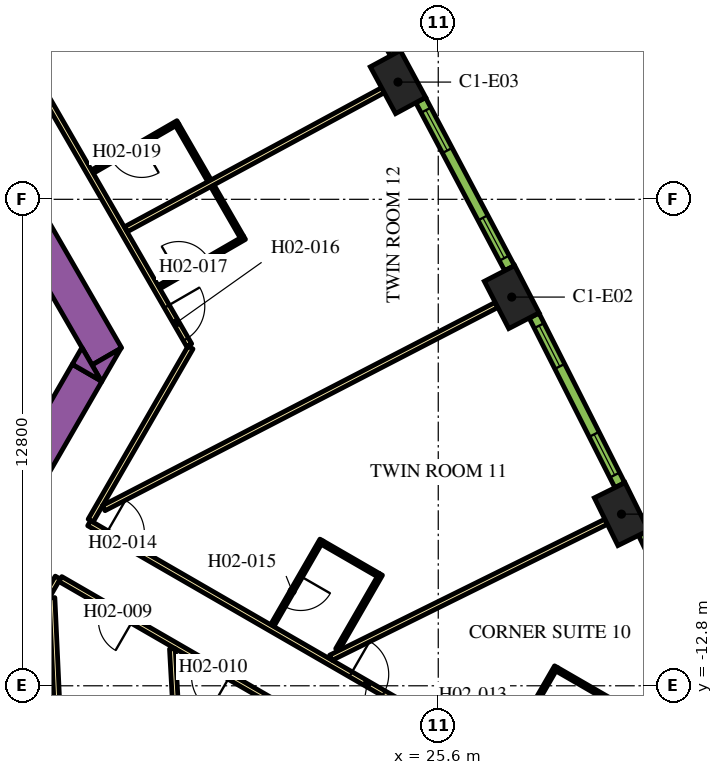
"""IFC4 building model, lengths in metres.
Left out: names, types, materials, properties, quantities, classifications, styles, units other than length and angle.
Written with IfcOpenShell. Run it as: python <this file> out.ifc"""

import sys

from ifc_helpers import new_model, si_unit, direction, frame, frame_2d, origin, origin_2d, place, context, subcontext, project, spatial, polyline, rectangle, outline, extrude, element, fill, save


model = new_model("IFC4")
c1 = context("Model", 3, precision=1e-05, world=origin(), true_north=direction((0.0, 1.0)))
c2 = subcontext(c1, "Body", "Model", "MODEL_VIEW")
j1 = project(units=[si_unit("LENGTHUNIT", "METRE"), si_unit("PLANEANGLEUNIT", "RADIAN")], contexts=[c1])
p1 = place(None, origin())
s1 = spatial("IfcSite", under=j1, at=p1, CompositionType="ELEMENT")
p2 = place(p1, origin())
s2 = spatial("IfcBuilding", under=s1, at=p2, CompositionType="ELEMENT")
p3 = place(p2, frame((0.0, 0.0, 43.2)))
s3 = spatial("IfcBuildingStorey", under=s2, at=p3, CompositionType="ELEMENT", Elevation=43.2)
for number, where, z_axis, x_axis in (
    (1, (30.421, -8.284, 0.0), (0.0, 0.0, 1.0), (-0.443, 0.897, 0.0)),
    (2, (27.533, -2.572, 0.0), (0.0, 0.0, 1.0), (-0.459, 0.888, 0.0)),
    (3, (24.54, 3.085, 0.0), (0.0, 0.0, 1.0), (-0.476, 0.88, 0.0)),
):
    element("IfcColumn", number, at=place(p3, frame(where, z_axis=z_axis, x_axis=x_axis)), inside=s3, PredefinedType="COLUMN", context=c2, shape_type="SweptSolid", body=[
        extrude(rectangle(XDim=1.4, YDim=0.9, at=origin_2d()), origin(), (0.0, 0.0, 1.0), 3.9),
    ])
p4 = place(p3, frame((6.776, 13.364, 0.0), z_axis=(0.0, 0.0, 1.0), x_axis=(0.500004177138, -0.8660229921, 0.0)))
e4 = element("IfcWall", 4, at=p4, inside=s3, PredefinedType="SOLIDWALL", context=c2, shape_type="SweptSolid", body=[
    extrude(rectangle(XDim=20.204, YDim=0.9, at=frame_2d((10.102, 0.0))), origin(), (0.0, 0.0, 1.0), 3.9),
])
p5 = place(p3, origin())
e5 = element("IfcWall", 5, at=p5, inside=s3, PredefinedType="SOLIDWALL", context=c2, shape_type="SweptSolid", body=[
    extrude(outline(polyline([(16.743, -4.8), (16.489, -4.36), (17.251, -3.92), (16.743, -4.8)])), origin(), (0.0, 0.0, 1.0), 3.9),
])
p6 = place(p3, frame((11.943, -12.214, 0.0), z_axis=(0.0, 0.0, 1.0), x_axis=(0.49998092645, 0.866036415623, 0.0)))
e6 = element("IfcWall", 6, at=p6, inside=s3, PredefinedType="SOLIDWALL", context=c2, shape_type="SweptSolid", body=[
    extrude(rectangle(XDim=8.83, YDim=0.9, at=frame_2d((4.415, 0.0))), origin(), (0.0, 0.0, 1.0), 3.9),
])
e7 = element("IfcWall", 7, at=p5, inside=s3, PredefinedType="SOLIDWALL", context=c2, shape_type="SweptSolid", body=[
    extrude(outline(polyline([(16.223, -3.9), (16.732, -4.78), (15.969, -4.34), (16.223, -3.9)])), origin(), (0.0, 0.0, 1.0), 3.9),
])
p7 = place(p3, frame((16.412, -8.523, 0.0), z_axis=(0.0, 0.0, 1.0), x_axis=(0.866022197818, -0.500005552856, 0.0)))
e8 = element("IfcWall", 8, at=p7, inside=s3, PredefinedType="PARTITIONING", context=c2, shape_type="SweptSolid", body=[
    extrude(rectangle(XDim=16.224, YDim=0.15, at=frame_2d((8.112, 0.0))), origin(), (0.0, 0.0, 1.0), 2.75),
])
p8 = place(p7, frame((7.949, 0.0, 0.0)))
e9 = element("IfcOpeningElement", 9, at=p8, cuts=e8, PredefinedType="OPENING", context=c2, shape_type="SweptSolid", body=[
    extrude(rectangle(XDim=1.0, YDim=2.1, at=frame_2d((0.5, 1.05))), frame((0.0, 0.085, 0.0), z_axis=(0.0, -1.0, 0.0), x_axis=(1.0, 0.0, 0.0)), (0.0, 0.0, 1.0), 0.17),
])
p9 = place(p7, frame((0.526, 0.0, 0.0)))
e10 = element("IfcOpeningElement", 10, at=p9, cuts=e8, PredefinedType="OPENING", context=c2, shape_type="SweptSolid", body=[
    extrude(rectangle(XDim=1.0, YDim=2.1, at=frame_2d((0.5, 1.05))), frame((0.0, 0.085, 0.0), z_axis=(0.0, -1.0, 0.0), x_axis=(1.0, 0.0, 0.0)), (0.0, 0.0, 1.0), 0.17),
])
p10 = place(p3, frame((19.081, -3.9, 0.0), z_axis=(0.0, 0.0, 1.0), x_axis=(-0.499974327079, -0.866040225545, 0.0)))
e11 = element("IfcWall", 11, at=p10, inside=s3, PredefinedType="PARTITIONING", context=c2, shape_type="SweptSolid", body=[
    extrude(rectangle(XDim=5.258, YDim=0.15, at=frame_2d((2.629, 0.0))), origin(), (0.0, 0.0, 1.0), 2.75),
])
p11 = place(p3, frame((6.163, 18.475, 0.0), z_axis=(0.0, 0.0, 1.0), x_axis=(0.500001317485, -0.866024643133, 0.0)))
e12 = element("IfcWall", 12, at=p11, inside=s3, PredefinedType="PARTITIONING", context=c2, shape_type="SweptSolid", body=[
    extrude(rectangle(XDim=25.767, YDim=0.15, at=frame_2d((12.883, 0.0))), origin(), (0.0, 0.0, 1.0), 2.75),
])
p12 = place(p11, frame((24.586, 0.0, 0.0)))
e13 = element("IfcOpeningElement", 13, at=p12, cuts=e12, PredefinedType="OPENING", context=c2, shape_type="SweptSolid", body=[
    extrude(rectangle(XDim=1.0, YDim=2.1, at=frame_2d((0.5, 1.05))), frame((0.0, 0.085, 0.0), z_axis=(0.0, -1.0, 0.0), x_axis=(1.0, 0.0, 0.0)), (0.0, 0.0, 1.0), 0.17),
])
p13 = place(p11, frame((16.196, 0.0, 0.0)))
e14 = element("IfcOpeningElement", 14, at=p13, cuts=e12, PredefinedType="OPENING", context=c2, shape_type="SweptSolid", body=[
    extrude(rectangle(XDim=1.0, YDim=2.1, at=frame_2d((0.5, 1.05))), frame((0.0, 0.085, 0.0), z_axis=(0.0, -1.0, 0.0), x_axis=(1.0, 0.0, 0.0)), (0.0, 0.0, 1.0), 0.17),
])
p14 = place(p11, frame((14.789, 0.0, 0.0)))
e15 = element("IfcOpeningElement", 15, at=p14, cuts=e12, PredefinedType="OPENING", context=c2, shape_type="SweptSolid", body=[
    extrude(rectangle(XDim=1.1, YDim=2.1, at=frame_2d((0.55, 1.05))), frame((0.0, 0.085, 0.0), z_axis=(0.0, -1.0, 0.0), x_axis=(1.0, 0.0, 0.0)), (0.0, 0.0, 1.0), 0.17),
])
p15 = place(p11, frame((3.698, 0.0, 0.0)))
e16 = element("IfcOpeningElement", 16, at=p15, cuts=e12, PredefinedType="OPENING", context=c2, shape_type="SweptSolid", body=[
    extrude(rectangle(XDim=1.0, YDim=2.1, at=frame_2d((0.5, 1.05))), frame((0.0, 0.085, 0.0), z_axis=(0.0, -1.0, 0.0), x_axis=(1.0, 0.0, 0.0)), (0.0, 0.0, 1.0), 0.17),
])
p16 = place(p11, frame((2.391, 0.0, 0.0)))
e17 = element("IfcOpeningElement", 17, at=p16, cuts=e12, PredefinedType="OPENING", context=c2, shape_type="SweptSolid", body=[
    extrude(rectangle(XDim=1.0, YDim=2.1, at=frame_2d((0.5, 1.05))), frame((0.0, 0.085, 0.0), z_axis=(0.0, -1.0, 0.0), x_axis=(1.0, 0.0, 0.0)), (0.0, 0.0, 1.0), 0.17),
])
p17 = place(p3, frame((15.587, -9.952, 0.0), z_axis=(0.0, 0.0, 1.0), x_axis=(-0.500016618951, -0.866015808616, 0.0)))
e18 = element("IfcWall", 18, at=p17, inside=s3, PredefinedType="PARTITIONING", context=c2, shape_type="SweptSolid", body=[
    extrude(rectangle(XDim=5.268, YDim=0.15, at=frame_2d((2.634, 0.0))), origin(), (0.0, 0.0, 1.0), 2.75),
])
p18 = place(p17, frame((2.465, 0.0, 0.0)))
e19 = element("IfcOpeningElement", 19, at=p18, cuts=e18, PredefinedType="OPENING", context=c2, shape_type="SweptSolid", body=[
    extrude(rectangle(XDim=0.9, YDim=2.1, at=frame_2d((0.45, 1.05))), frame((0.0, 0.085, 0.0), z_axis=(0.0, -1.0, 0.0), x_axis=(1.0, 0.0, 0.0)), (0.0, 0.0, 1.0), 0.17),
])
p19 = place(p3, frame((29.638, -18.064, 0.0), z_axis=(0.0, 0.0, 1.0), x_axis=(-0.866026175601, 0.499998663172, 0.0)))
e20 = element("IfcWall", 20, at=p19, inside=s3, PredefinedType="PARTITIONING", context=c2, shape_type="SweptSolid", body=[
    extrude(rectangle(XDim=16.144, YDim=0.15, at=frame_2d((8.072, 0.0))), origin(), (0.0, 0.0, 1.0), 2.75),
])
p20 = place(p19, frame((13.948, 0.0, 0.0)))
e21 = element("IfcOpeningElement", 21, at=p20, cuts=e20, PredefinedType="OPENING", context=c2, shape_type="SweptSolid", body=[
    extrude(rectangle(XDim=0.9, YDim=2.1, at=frame_2d((0.45, 1.05))), frame((0.0, 0.085, 0.0), z_axis=(0.0, -1.0, 0.0), x_axis=(1.0, 0.0, 0.0)), (0.0, 0.0, 1.0), 0.17),
])
p21 = place(p19, frame((11.004, 0.0, 0.0)))
e22 = element("IfcOpeningElement", 22, at=p21, cuts=e20, PredefinedType="OPENING", context=c2, shape_type="SweptSolid", body=[
    extrude(rectangle(XDim=1.0, YDim=2.1, at=frame_2d((0.5, 1.05))), frame((0.0, 0.085, 0.0), z_axis=(0.0, -1.0, 0.0), x_axis=(1.0, 0.0, 0.0)), (0.0, 0.0, 1.0), 0.17),
])
p22 = place(p3, frame((15.973, -22.109, 0.0), z_axis=(0.0, 0.0, 1.0), x_axis=(-0.046191717129, 0.998932592955, 0.0)))
e23 = element("IfcWall", 23, at=p22, inside=s3, PredefinedType="PARTITIONING", context=c2, shape_type="SweptSolid", body=[
    extrude(rectangle(XDim=11.638, YDim=0.15, at=frame_2d((5.819, 0.0))), origin(), (0.0, 0.0, 1.0), 2.75),
])
p23 = place(p3, frame((27.134, -2.779, 0.0), z_axis=(0.0, 0.0, 1.0), x_axis=(-0.8882049501, -0.459447457951, 0.0)))
e24 = element("IfcWall", 24, at=p23, inside=s3, PredefinedType="PARTITIONING", context=c2, shape_type="SweptSolid", body=[
    extrude(rectangle(XDim=11.638, YDim=0.15, at=frame_2d((5.819, 0.0))), origin(), (0.0, 0.0, 1.0), 2.75),
])
p24 = place(p3, frame((24.145, 2.871, 0.0), z_axis=(0.0, 0.0, 1.0), x_axis=(-0.879551725039, -0.475803281809, 0.0)))
e25 = element("IfcWall", 25, at=p24, inside=s3, PredefinedType="PARTITIONING", context=c2, shape_type="SweptSolid", body=[
    extrude(rectangle(XDim=7.688, YDim=0.15, at=frame_2d((3.844, 0.0))), origin(), (0.0, 0.0, 1.0), 2.75),
])
p25 = place(p3, frame((19.198, -22.541, 0.0), z_axis=(0.0, 0.0, 1.0), x_axis=(-0.055432210572, 0.99846245299, 0.0)))
e26 = element("IfcWall", 26, at=p25, inside=s3, PredefinedType="PARTITIONING", context=c2, shape_type="SweptSolid", body=[
    extrude(rectangle(XDim=10.729, YDim=0.15, at=frame_2d((5.365, 0.0))), origin(), (0.0, 0.0, 1.0), 2.75),
])
p26 = place(p3, frame((30.018, -8.483, 0.0), z_axis=(0.0, 0.0, 1.0), x_axis=(-0.896544505264, -0.44295366584, 0.0)))
e27 = element("IfcWall", 27, at=p26, inside=s3, PredefinedType="PARTITIONING", context=c2, shape_type="SweptSolid", body=[
    extrude(rectangle(XDim=8.079, YDim=0.15, at=frame_2d((4.04, 0.0))), origin(), (0.0, 0.0, 1.0), 2.75),
])
p27 = place(p3, frame((28.704, -12.3, 0.0), z_axis=(0.0, 0.0, 1.0), x_axis=(-0.49998411664, -0.866034573852, 0.0)))
e28 = element("IfcWall", 28, at=p27, inside=s3, PredefinedType="PARTITIONING", context=c2, shape_type="SweptSolid", body=[
    extrude(rectangle(XDim=2.8, YDim=0.1, at=frame_2d((1.4, 0.0))), origin(), (0.0, 0.0, 1.0), 2.75),
])
p28 = place(p27, frame((1.3, 0.0, 0.0)))
e29 = element("IfcOpeningElement", 29, at=p28, cuts=e28, PredefinedType="OPENING", context=c2, shape_type="SweptSolid", body=[
    extrude(rectangle(XDim=0.9, YDim=2.1, at=frame_2d((0.45, 1.05))), frame((0.0, 0.06, 0.0), z_axis=(0.0, -1.0, 0.0), x_axis=(1.0, 0.0, 0.0)), (0.0, 0.0, 1.0), 0.12),
])
p29 = place(p3, frame((28.722, -12.368, 0.0), z_axis=(0.0, 0.0, 1.0), x_axis=(0.866050077142, -0.499957262057, 0.0)))
e30 = element("IfcWall", 30, at=p29, inside=s3, PredefinedType="PARTITIONING", context=c2, shape_type="SweptSolid", body=[
    extrude(rectangle(XDim=2.4, YDim=0.1, at=frame_2d((1.2, 0.0))), origin(), (0.0, 0.0, 1.0), 2.75),
])
p30 = place(p3, frame((22.53, -8.966, 0.0), z_axis=(0.0, 0.0, 1.0), x_axis=(-0.500006934395, -0.866021400173, 0.0)))
e31 = element("IfcWall", 31, at=p30, inside=s3, PredefinedType="PARTITIONING", context=c2, shape_type="SweptSolid", body=[
    extrude(rectangle(XDim=2.6, YDim=0.1, at=frame_2d((1.3, 0.0))), origin(), (0.0, 0.0, 1.0), 2.75),
])
p31 = place(p30, frame((1.1, 0.0, 0.0)))
e32 = element("IfcOpeningElement", 32, at=p31, cuts=e31, PredefinedType="OPENING", context=c2, shape_type="SweptSolid", body=[
    extrude(rectangle(XDim=0.9, YDim=2.1, at=frame_2d((0.45, 1.05))), frame((0.0, 0.06, 0.0), z_axis=(0.0, -1.0, 0.0), x_axis=(1.0, 0.0, 0.0)), (0.0, 0.0, 1.0), 0.12),
])
p32 = place(p3, frame((22.549, -9.035, 0.0), z_axis=(0.0, 0.0, 1.0), x_axis=(0.86605165483, -0.499954529098, 0.0)))
e33 = element("IfcWall", 33, at=p32, inside=s3, PredefinedType="PARTITIONING", context=c2, shape_type="SweptSolid", body=[
    extrude(rectangle(XDim=1.7, YDim=0.1, at=frame_2d((0.85, 0.0))), origin(), (0.0, 0.0, 1.0), 2.75),
])
p33 = place(p3, frame((22.944, -11.85, 0.0), z_axis=(0.0, 0.0, 1.0), x_axis=(0.499968531483, 0.866043571379, 0.0)))
e34 = element("IfcWall", 34, at=p33, inside=s3, PredefinedType="PARTITIONING", context=c2, shape_type="SweptSolid", body=[
    extrude(rectangle(XDim=2.29, YDim=0.1, at=frame_2d((1.145, 0.0))), origin(), (0.0, 0.0, 1.0), 2.75),
])
p34 = place(p3, frame((18.25, -2.311, 0.0), z_axis=(0.0, 0.0, 1.0), x_axis=(0.866021400173, 0.500006934395, 0.0)))
e35 = element("IfcWall", 35, at=p34, inside=s3, PredefinedType="PARTITIONING", context=c2, shape_type="SweptSolid", body=[
    extrude(rectangle(XDim=2.6, YDim=0.1, at=frame_2d((1.3, 0.0))), origin(), (0.0, 0.0, 1.0), 2.75),
])
p35 = place(p34, frame((0.6, 0.0, 0.0)))
e36 = element("IfcOpeningElement", 36, at=p35, cuts=e35, PredefinedType="OPENING", context=c2, shape_type="SweptSolid", body=[
    extrude(rectangle(XDim=0.9, YDim=2.1, at=frame_2d((0.45, 1.05))), frame((0.0, 0.06, 0.0), z_axis=(0.0, -1.0, 0.0), x_axis=(1.0, 0.0, 0.0)), (0.0, 0.0, 1.0), 0.12),
])
p36 = place(p3, frame((20.434, -0.993, 0.0), z_axis=(0.0, 0.0, 1.0), x_axis=(-0.500086022567, 0.865975732936, 0.0)))
e37 = element("IfcWall", 37, at=p36, inside=s3, PredefinedType="PARTITIONING", context=c2, shape_type="SweptSolid", body=[
    extrude(rectangle(XDim=1.55, YDim=0.1, at=frame_2d((0.775, 0.0))), origin(), (0.0, 0.0, 1.0), 2.75),
])
p37 = place(p3, frame((18.749, 2.026, 0.0), z_axis=(0.0, 0.0, 1.0), x_axis=(-0.866021400173, -0.500006934395, 0.0)))
e38 = element("IfcWall", 38, at=p37, inside=s3, PredefinedType="PARTITIONING", context=c2, shape_type="SweptSolid", body=[
    extrude(rectangle(XDim=2.6, YDim=0.1, at=frame_2d((1.3, 0.0))), origin(), (0.0, 0.0, 1.0), 2.75),
])
p38 = place(p37, frame((1.1, 0.0, 0.0)))
e39 = element("IfcOpeningElement", 39, at=p38, cuts=e38, PredefinedType="OPENING", context=c2, shape_type="SweptSolid", body=[
    extrude(rectangle(XDim=0.9, YDim=2.1, at=frame_2d((0.45, 1.05))), frame((0.0, 0.06, 0.0), z_axis=(0.0, -1.0, 0.0), x_axis=(1.0, 0.0, 0.0)), (0.0, 0.0, 1.0), 0.12),
])
p39 = place(p3, frame((18.731, 1.958, 0.0), z_axis=(0.0, 0.0, 1.0), x_axis=(0.499976720371, -0.866038843867, 0.0)))
e40 = element("IfcWall", 40, at=p39, inside=s3, PredefinedType="PARTITIONING", context=c2, shape_type="SweptSolid", body=[
    extrude(rectangle(XDim=1.69, YDim=0.1, at=frame_2d((0.845, 0.0))), origin(), (0.0, 0.0, 1.0), 2.75),
])
p40 = place(p3, frame((33.176, -13.29, 0.0), z_axis=(0.0, 0.0, 1.0), x_axis=(-0.434664499056, 0.900592456808, 0.0)))
e41 = element("IfcWall", 41, at=p40, inside=s3, PredefinedType="SOLIDWALL", context=c2, shape_type="SweptSolid", body=[
    extrude(rectangle(XDim=5.006, YDim=0.29, at=frame_2d((2.503, 0.0))), origin(), (0.0, 0.0, 1.0), 3.65),
])
p41 = place(p40, frame((0.265, 0.0, 0.9)))
e42 = element("IfcOpeningElement", 42, at=p41, cuts=e41, PredefinedType="OPENING", context=c2, shape_type="SweptSolid", body=[
    extrude(rectangle(XDim=1.2, YDim=2.15, at=frame_2d((0.6, 1.075))), frame((0.0, 0.155, 0.0), z_axis=(0.0, -1.0, 0.0), x_axis=(1.0, 0.0, 0.0)), (0.0, 0.0, 1.0), 0.31),
])
p42 = place(p40, frame((3.496, 0.0, 0.9)))
e43 = element("IfcOpeningElement", 43, at=p42, cuts=e41, PredefinedType="OPENING", context=c2, shape_type="SweptSolid", body=[
    extrude(rectangle(XDim=1.2, YDim=2.15, at=frame_2d((0.6, 1.075))), frame((0.0, 0.155, 0.0), z_axis=(0.0, -1.0, 0.0), x_axis=(1.0, 0.0, 0.0)), (0.0, 0.0, 1.0), 0.31),
])
p43 = place(p3, frame((30.377, -7.521, 0.0), z_axis=(0.0, 0.0, 1.0), x_axis=(-0.451233929645, 0.892405704115, 0.0)))
e44 = element("IfcWall", 44, at=p43, inside=s3, PredefinedType="SOLIDWALL", context=c2, shape_type="SweptSolid", body=[
    extrude(rectangle(XDim=4.998, YDim=0.29, at=frame_2d((2.499, 0.0))), origin(), (0.0, 0.0, 1.0), 3.65),
])
p44 = place(p43, frame((0.297, 0.0, 0.9)))
e45 = element("IfcOpeningElement", 45, at=p44, cuts=e44, PredefinedType="OPENING", context=c2, shape_type="SweptSolid", body=[
    extrude(rectangle(XDim=1.2, YDim=2.15, at=frame_2d((0.6, 1.075))), frame((0.0, 0.155, 0.0), z_axis=(0.0, -1.0, 0.0), x_axis=(1.0, 0.0, 0.0)), (0.0, 0.0, 1.0), 0.31),
])
p45 = place(p43, frame((3.501, 0.0, 0.9)))
e46 = element("IfcOpeningElement", 46, at=p45, cuts=e44, PredefinedType="OPENING", context=c2, shape_type="SweptSolid", body=[
    extrude(rectangle(XDim=1.2, YDim=2.15, at=frame_2d((0.6, 1.075))), frame((0.0, 0.155, 0.0), z_axis=(0.0, -1.0, 0.0), x_axis=(1.0, 0.0, 0.0)), (0.0, 0.0, 1.0), 0.31),
])
p46 = place(p3, frame((27.475, -1.81, 0.0), z_axis=(0.0, 0.0, 1.0), x_axis=(-0.467629620899, 0.883924509026, 0.0)))
e47 = element("IfcWall", 47, at=p46, inside=s3, PredefinedType="SOLIDWALL", context=c2, shape_type="SweptSolid", body=[
    extrude(rectangle(XDim=4.998, YDim=0.29, at=frame_2d((2.499, 0.0))), origin(), (0.0, 0.0, 1.0), 3.65),
])
p47 = place(p46, frame((0.297, 0.0, 0.9)))
e48 = element("IfcOpeningElement", 48, at=p47, cuts=e47, PredefinedType="OPENING", context=c2, shape_type="SweptSolid", body=[
    extrude(rectangle(XDim=1.2, YDim=2.15, at=frame_2d((0.6, 1.075))), frame((0.0, 0.155, 0.0), z_axis=(0.0, -1.0, 0.0), x_axis=(1.0, 0.0, 0.0)), (0.0, 0.0, 1.0), 0.31),
])
p48 = place(p46, frame((3.501, 0.0, 0.9)))
e49 = element("IfcOpeningElement", 49, at=p48, cuts=e47, PredefinedType="OPENING", context=c2, shape_type="SweptSolid", body=[
    extrude(rectangle(XDim=1.2, YDim=2.15, at=frame_2d((0.6, 1.075))), frame((0.0, 0.155, 0.0), z_axis=(0.0, -1.0, 0.0), x_axis=(1.0, 0.0, 0.0)), (0.0, 0.0, 1.0), 0.31),
])
p49 = place(p3, frame((24.468, 3.846, 0.0), z_axis=(0.0, 0.0, 1.0), x_axis=(-0.483912572871, 0.875116347589, 0.0)))
e50 = element("IfcWall", 50, at=p49, inside=s3, PredefinedType="SOLIDWALL", context=c2, shape_type="SweptSolid", body=[
    extrude(rectangle(XDim=4.998, YDim=0.29, at=frame_2d((2.499, 0.0))), origin(), (0.0, 0.0, 1.0), 3.65),
])
p50 = place(p49, frame((0.297, 0.0, 0.9)))
e51 = element("IfcOpeningElement", 51, at=p50, cuts=e50, PredefinedType="OPENING", context=c2, shape_type="SweptSolid", body=[
    extrude(rectangle(XDim=1.2, YDim=2.15, at=frame_2d((0.6, 1.075))), frame((0.0, 0.155, 0.0), z_axis=(0.0, -1.0, 0.0), x_axis=(1.0, 0.0, 0.0)), (0.0, 0.0, 1.0), 0.31),
])
p51 = place(p49, frame((3.501, 0.0, 0.9)))
e52 = element("IfcOpeningElement", 52, at=p51, cuts=e50, PredefinedType="OPENING", context=c2, shape_type="SweptSolid", body=[
    extrude(rectangle(XDim=1.2, YDim=2.15, at=frame_2d((0.6, 1.075))), frame((0.0, 0.155, 0.0), z_axis=(0.0, -1.0, 0.0), x_axis=(1.0, 0.0, 0.0)), (0.0, 0.0, 1.0), 0.31),
])
p52 = place(p20, origin())
e53 = element("IfcDoor", 53, at=p52, inside=s3, OperationType="SINGLE_SWING_RIGHT", PredefinedType="DOOR", context=c2, shape_type="SweptSolid", body=[
    extrude(rectangle(XDim=0.9, YDim=2.1, at=frame_2d((0.45, 1.05))), frame((0.0, 0.025, 0.0), z_axis=(0.0, -1.0, 0.0), x_axis=(1.0, 0.0, 0.0)), (0.0, 0.0, 1.0), 0.05),
])
fill(e21, e53)
p53 = place(p21, origin())
e54 = element("IfcDoor", 54, at=p53, inside=s3, OperationType="SINGLE_SWING_RIGHT", PredefinedType="DOOR", context=c2, shape_type="SweptSolid", body=[
    extrude(rectangle(XDim=1.0, YDim=2.1, at=frame_2d((0.5, 1.05))), frame((0.0, 0.025, 0.0), z_axis=(0.0, -1.0, 0.0), x_axis=(1.0, 0.0, 0.0)), (0.0, 0.0, 1.0), 0.05),
])
fill(e22, e54)
p54 = place(p8, origin())
e55 = element("IfcDoor", 55, at=p54, inside=s3, OperationType="SINGLE_SWING_LEFT", PredefinedType="DOOR", context=c2, shape_type="SweptSolid", body=[
    extrude(rectangle(XDim=1.0, YDim=2.1, at=frame_2d((0.5, 1.05))), frame((0.0, 0.025, 0.0), z_axis=(0.0, -1.0, 0.0), x_axis=(1.0, 0.0, 0.0)), (0.0, 0.0, 1.0), 0.05),
])
fill(e9, e55)
p55 = place(p9, origin())
e56 = element("IfcDoor", 56, at=p55, inside=s3, OperationType="SINGLE_SWING_LEFT", PredefinedType="DOOR", context=c2, shape_type="SweptSolid", body=[
    extrude(rectangle(XDim=1.0, YDim=2.1, at=frame_2d((0.5, 1.05))), frame((0.0, 0.025, 0.0), z_axis=(0.0, -1.0, 0.0), x_axis=(1.0, 0.0, 0.0)), (0.0, 0.0, 1.0), 0.05),
])
fill(e10, e56)
p56 = place(p31, origin())
e57 = element("IfcDoor", 57, at=p56, inside=s3, OperationType="SINGLE_SWING_LEFT", PredefinedType="DOOR", context=c2, shape_type="SweptSolid", body=[
    extrude(rectangle(XDim=0.9, YDim=2.1, at=frame_2d((0.45, 1.05))), frame((0.0, 0.025, 0.0), z_axis=(0.0, -1.0, 0.0), x_axis=(1.0, 0.0, 0.0)), (0.0, 0.0, 1.0), 0.05),
])
fill(e32, e57)
p57 = place(p12, origin())
e58 = element("IfcDoor", 58, at=p57, inside=s3, OperationType="SINGLE_SWING_RIGHT", PredefinedType="DOOR", context=c2, shape_type="SweptSolid", body=[
    extrude(rectangle(XDim=1.0, YDim=2.1, at=frame_2d((0.5, 1.05))), frame((0.0, 0.025, 0.0), z_axis=(0.0, -1.0, 0.0), x_axis=(1.0, 0.0, 0.0)), (0.0, 0.0, 1.0), 0.05),
])
fill(e13, e58)
p58 = place(p35, origin())
e59 = element("IfcDoor", 59, at=p58, inside=s3, OperationType="SINGLE_SWING_RIGHT", PredefinedType="DOOR", context=c2, shape_type="SweptSolid", body=[
    extrude(rectangle(XDim=0.9, YDim=2.1, at=frame_2d((0.45, 1.05))), frame((0.0, 0.025, 0.0), z_axis=(0.0, -1.0, 0.0), x_axis=(1.0, 0.0, 0.0)), (0.0, 0.0, 1.0), 0.05),
])
fill(e36, e59)
p59 = place(p38, origin())
e60 = element("IfcDoor", 60, at=p59, inside=s3, OperationType="SINGLE_SWING_LEFT", PredefinedType="DOOR", context=c2, shape_type="SweptSolid", body=[
    extrude(rectangle(XDim=0.9, YDim=2.1, at=frame_2d((0.45, 1.05))), frame((0.0, 0.025, 0.0), z_axis=(0.0, -1.0, 0.0), x_axis=(1.0, 0.0, 0.0)), (0.0, 0.0, 1.0), 0.05),
])
fill(e39, e60)
p60 = place(p44, origin())
e61 = element("IfcWindow", 61, at=p60, inside=s3, PartitioningType="DOUBLE_PANEL_VERTICAL", PredefinedType="WINDOW", context=c2, shape_type="SweptSolid", body=[
    extrude(rectangle(XDim=1.2, YDim=2.15, at=frame_2d((0.6, 1.075))), frame((0.0, 0.015, 0.0), z_axis=(0.0, -1.0, 0.0), x_axis=(1.0, 0.0, 0.0)), (0.0, 0.0, 1.0), 0.06),
])
fill(e45, e61)
p61 = place(p45, origin())
e62 = element("IfcWindow", 62, at=p61, inside=s3, PartitioningType="DOUBLE_PANEL_VERTICAL", PredefinedType="WINDOW", context=c2, shape_type="SweptSolid", body=[
    extrude(rectangle(XDim=1.2, YDim=2.15, at=frame_2d((0.6, 1.075))), frame((0.0, 0.015, 0.0), z_axis=(0.0, -1.0, 0.0), x_axis=(1.0, 0.0, 0.0)), (0.0, 0.0, 1.0), 0.06),
])
fill(e46, e62)
p62 = place(p47, origin())
e63 = element("IfcWindow", 63, at=p62, inside=s3, PartitioningType="DOUBLE_PANEL_VERTICAL", PredefinedType="WINDOW", context=c2, shape_type="SweptSolid", body=[
    extrude(rectangle(XDim=1.2, YDim=2.15, at=frame_2d((0.6, 1.075))), frame((0.0, 0.015, 0.0), z_axis=(0.0, -1.0, 0.0), x_axis=(1.0, 0.0, 0.0)), (0.0, 0.0, 1.0), 0.06),
])
fill(e48, e63)
p63 = place(p48, origin())
e64 = element("IfcWindow", 64, at=p63, inside=s3, PartitioningType="DOUBLE_PANEL_VERTICAL", PredefinedType="WINDOW", context=c2, shape_type="SweptSolid", body=[
    extrude(rectangle(XDim=1.2, YDim=2.15, at=frame_2d((0.6, 1.075))), frame((0.0, 0.015, 0.0), z_axis=(0.0, -1.0, 0.0), x_axis=(1.0, 0.0, 0.0)), (0.0, 0.0, 1.0), 0.06),
])
fill(e49, e64)
save(model, sys.argv[1])
